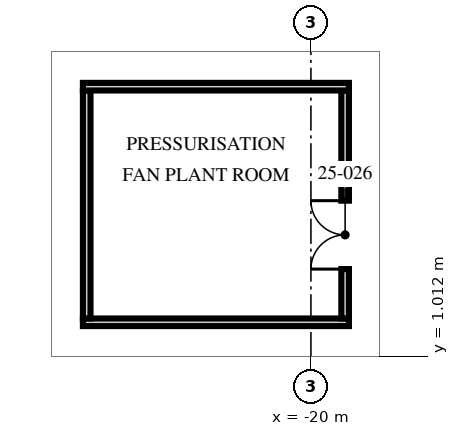
"""IFC4 building model, lengths in metres.
Left out: names, types, materials, properties, quantities, classifications, styles, units other than length and angle.
Written with IfcOpenShell. Run it as: python <this file> out.ifc"""

import sys

from ifc_helpers import new_model, si_unit, direction, frame, frame_2d, origin, origin_2d, place, context, subcontext, project, spatial, rectangle, hollow_rectangle, extrude, element, fill, save


model = new_model("IFC4")
c1 = context("Model", 3, precision=1e-05, world=origin(), true_north=direction((0.0, 1.0)))
c2 = subcontext(c1, "Body", "Model", "MODEL_VIEW")
j1 = project(units=[si_unit("LENGTHUNIT", "METRE"), si_unit("PLANEANGLEUNIT", "RADIAN")], contexts=[c1])
p1 = place(None, origin())
s1 = spatial("IfcSite", under=j1, at=p1, CompositionType="ELEMENT")
p2 = place(p1, origin())
s2 = spatial("IfcBuilding", under=s1, at=p2, CompositionType="ELEMENT")
p3 = place(p2, frame((0.0, 0.0, 99.75)))
s3 = spatial("IfcBuildingStorey", under=s2, at=p3, CompositionType="ELEMENT", Elevation=99.75)
p4 = place(p3, frame((-29.8, 0.0, -0.65), z_axis=(0.334765406017, 0.0, 0.942301503201), x_axis=(0.0, 1.0, 0.0)))
e1 = element("IfcColumn", 1, at=p4, inside=s3, PredefinedType="COLUMN", context=c2, shape_type="SweptSolid", body=[
    extrude(hollow_rectangle(XDim=3.2, YDim=1.8, WallThickness=0.2, at=origin_2d()), origin(), (0.0, 0.0, 1.0), 8.065),
])
p5 = place(p3, frame((-29.8, 10.0, -0.65), z_axis=(0.332963994967, -0.103601510687, 0.937230870724), x_axis=(0.034712905596, 0.994618884766, 0.097612951251)))
e2 = element("IfcColumn", 2, at=p5, inside=s3, PredefinedType="COLUMN", context=c2, shape_type="SweptSolid", body=[
    extrude(hollow_rectangle(XDim=3.2, YDim=1.8, WallThickness=0.2, at=origin_2d()), origin(), (0.0, 0.0, 1.0), 8.109),
])
p6 = place(p3, frame((-26.0, 1.9, 0.0), z_axis=(0.0, 0.0, 1.0), x_axis=(1.0, 0.0, 0.0)))
e3 = element("IfcWall", 3, at=p6, inside=s3, PredefinedType="SOLIDWALL", context=c2, shape_type="SweptSolid", body=[
    extrude(rectangle(XDim=7.0, YDim=0.2, at=frame_2d((3.5, 0.0))), origin(), (0.0, 0.0, 1.0), 7.25),
])
p7 = place(p3, frame((-25.9, 2.0, 0.0), z_axis=(0.0, 0.0, 1.0), x_axis=(0.0, 1.0, 0.0)))
e4 = element("IfcWall", 4, at=p7, inside=s3, PredefinedType="SOLIDWALL", context=c2, shape_type="SweptSolid", body=[
    extrude(rectangle(XDim=6.0, YDim=0.2, at=frame_2d((3.0, 0.0))), origin(), (0.0, 0.0, 1.0), 6.46),
])
p8 = place(p3, frame((-19.1, 2.0, 0.0), z_axis=(0.0, 0.0, 1.0), x_axis=(0.0, 1.0, 0.0)))
e5 = element("IfcWall", 5, at=p8, inside=s3, PredefinedType="SOLIDWALL", context=c2, shape_type="SweptSolid", body=[
    extrude(rectangle(XDim=6.0, YDim=0.2, at=frame_2d((3.0, 0.0))), origin(), (0.0, 0.0, 1.0), 6.46),
])
p9 = place(p8, frame((1.3, 0.0, 0.0)))
e6 = element("IfcOpeningElement", 6, at=p9, cuts=e5, PredefinedType="OPENING", context=c2, shape_type="SweptSolid", body=[
    extrude(rectangle(XDim=1.8, YDim=2.4, at=frame_2d((0.9, 1.2))), frame((0.0, 0.11, 0.0), z_axis=(0.0, -1.0, 0.0), x_axis=(1.0, 0.0, 0.0)), (0.0, 0.0, 1.0), 0.22),
])
p10 = place(p3, frame((-26.0, 8.1, 0.0), z_axis=(0.0, 0.0, 1.0), x_axis=(1.0, 0.0, 0.0)))
e7 = element("IfcWall", 7, at=p10, inside=s3, PredefinedType="SOLIDWALL", context=c2, shape_type="SweptSolid", body=[
    extrude(rectangle(XDim=7.0, YDim=0.2, at=frame_2d((3.5, 0.0))), origin(), (0.0, 0.0, 1.0), 7.25),
])
p11 = place(p9, origin())
e8 = element("IfcDoor", 8, at=p11, inside=s3, OperationType="DOUBLE_DOOR_SINGLE_SWING", PredefinedType="DOOR", context=c2, shape_type="SweptSolid", body=[
    extrude(rectangle(XDim=1.8, YDim=2.4, at=frame_2d((0.9, 1.2))), frame((0.0, 0.025, 0.0), z_axis=(0.0, -1.0, 0.0), x_axis=(1.0, 0.0, 0.0)), (0.0, 0.0, 1.0), 0.05),
])
fill(e6, e8)
save(model, sys.argv[1])
